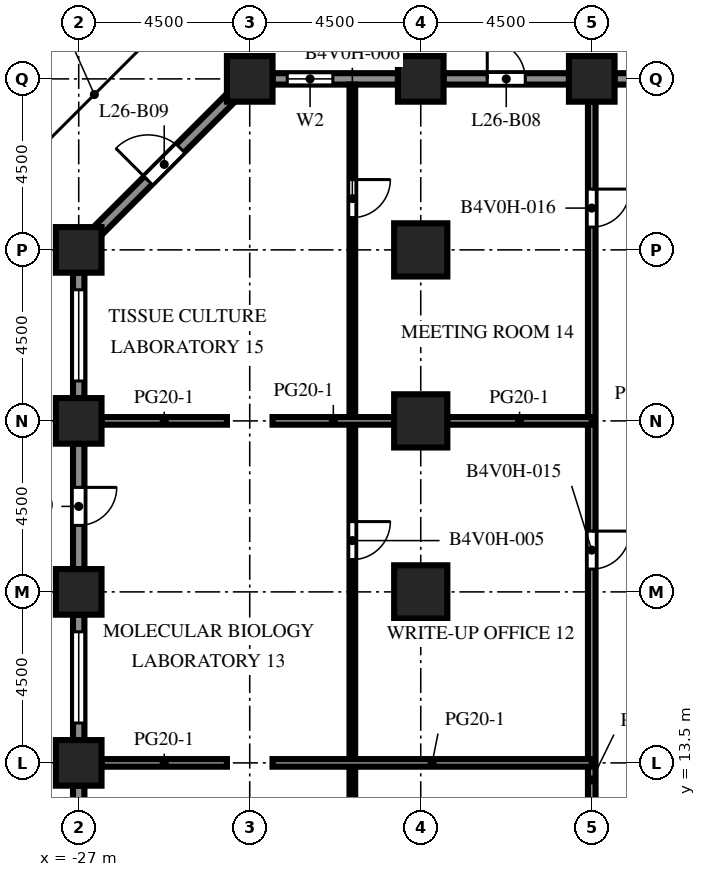
"""IFC4 building model, lengths in metres.
Left out: names, types, materials, properties, quantities, classifications, styles, units other than length and angle.
Written with IfcOpenShell. Run it as: python <this file> out.ifc"""

import sys

from ifc_helpers import new_model, si_unit, direction, frame, frame_2d, origin, origin_2d, place, context, subcontext, project, spatial, rectangle, extrude, element, fill, save


model = new_model("IFC4")
c1 = context("Model", 3, precision=1e-05, world=origin(), true_north=direction((0.0, 1.0)))
c2 = subcontext(c1, "Body", "Model", "MODEL_VIEW")
j1 = project(units=[si_unit("LENGTHUNIT", "METRE"), si_unit("PLANEANGLEUNIT", "RADIAN")], contexts=[c1])
p1 = place(None, origin())
s1 = spatial("IfcSite", under=j1, at=p1, CompositionType="ELEMENT")
p2 = place(p1, origin())
s2 = spatial("IfcBuilding", under=s1, at=p2, CompositionType="ELEMENT")
p3 = place(p2, frame((0.0, 0.0, 116.7)))
s3 = spatial("IfcBuildingStorey", under=s2, at=p3, CompositionType="ELEMENT", Elevation=116.7)
for number, where, z_axis, x_axis in (
    (1, (-27.0, 13.5, -0.45), (0.0, 0.0, 1.0), (1.0, 0.0, 0.0)),
    (2, (-27.0, 18.0, -0.45), (0.0, 0.0, 1.0), (1.0, 0.0, 0.0)),
    (3, (-27.0, 22.5, -0.45), (0.0, 0.0, 1.0), (1.0, 0.0, 0.0)),
    (4, (-27.0, 27.0, -0.45), (0.0, 0.0, 1.0), (1.0, 0.0, 0.0)),
):
    element("IfcColumn", number, at=place(p3, frame(where, z_axis=z_axis, x_axis=x_axis)), inside=s3, PredefinedType="COLUMN", context=c2, shape_type="SweptSolid", body=[
        extrude(rectangle(XDim=1.2, YDim=1.2, at=origin_2d()), origin(), (0.0, 0.0, 1.0), 4.55),
    ])
for number, where, z_axis, x_axis in (
    (5, (-22.5, 31.5, 0.0), (0.0, 0.0, 1.0), (1.0, 0.0, 0.0)),
    (6, (-18.0, 31.5, 0.0), (0.0, 0.0, 1.0), (1.0, 0.0, 0.0)),
    (7, (-13.5, 31.5, 0.0), (0.0, 0.0, 1.0), (1.0, 0.0, 0.0)),
):
    element("IfcColumn", number, at=place(p3, frame(where, z_axis=z_axis, x_axis=x_axis)), inside=s3, PredefinedType="COLUMN", context=c2, shape_type="SweptSolid", body=[
        extrude(rectangle(XDim=1.2, YDim=1.2, at=origin_2d()), origin(), (0.0, 0.0, 1.0), 4.1),
    ])
p4 = place(p3, frame((-18.0, 18.0, -0.45), z_axis=(0.0, 0.0, 1.0), x_axis=(1.0, 0.0, 0.0)))
e8 = element("IfcColumn", 8, at=p4, inside=s3, PredefinedType="COLUMN", context=c2, shape_type="SweptSolid", body=[
    extrude(rectangle(XDim=1.4, YDim=1.4, at=origin_2d()), origin(), (0.0, 0.0, 1.0), 4.55),
])
p5 = place(p3, frame((-18.0, 22.5, 0.0), z_axis=(0.0, 0.0, 1.0), x_axis=(1.0, 0.0, 0.0)))
e9 = element("IfcColumn", 9, at=p5, inside=s3, PredefinedType="COLUMN", context=c2, shape_type="SweptSolid", body=[
    extrude(rectangle(XDim=1.4, YDim=1.4, at=origin_2d()), origin(), (0.0, 0.0, 1.0), 4.1),
])
p6 = place(p3, frame((-18.0, 27.0, -0.45), z_axis=(0.0, 0.0, 1.0), x_axis=(1.0, 0.0, 0.0)))
e10 = element("IfcColumn", 10, at=p6, inside=s3, PredefinedType="COLUMN", context=c2, shape_type="SweptSolid", body=[
    extrude(rectangle(XDim=1.4, YDim=1.4, at=origin_2d()), origin(), (0.0, 0.0, 1.0), 4.55),
])
p7 = place(p3, frame((-12.9, 31.5, 0.0), z_axis=(0.0, 0.0, 1.0), x_axis=(1.0, 0.0, 0.0)))
e11 = element("IfcWall", 11, at=p7, inside=s3, PredefinedType="SOLIDWALL", context=c2, shape_type="SweptSolid", body=[
    extrude(rectangle(XDim=3.3, YDim=0.3, at=frame_2d((1.65, 0.0))), origin(), (0.0, 0.0, 1.0), 2.75),
])
p8 = place(p7, frame((0.525, 0.0, 0.8)))
e12 = element("IfcOpeningElement", 12, at=p8, cuts=e11, PredefinedType="OPENING", context=c2, shape_type="SweptSolid", body=[
    extrude(rectangle(XDim=1.2, YDim=1.7, at=frame_2d((0.6, 0.85))), frame((0.0, 0.16, 0.0), z_axis=(0.0, -1.0, 0.0), x_axis=(1.0, 0.0, 0.0)), (0.0, 0.0, 1.0), 0.32),
])
p9 = place(p3, frame((-17.4, 31.5, 0.0), z_axis=(0.0, 0.0, 1.0), x_axis=(1.0, 0.0, 0.0)))
e13 = element("IfcWall", 13, at=p9, inside=s3, PredefinedType="SOLIDWALL", context=c2, shape_type="SweptSolid", body=[
    extrude(rectangle(XDim=3.3, YDim=0.3, at=frame_2d((1.65, 0.0))), origin(), (0.0, 0.0, 1.0), 2.75),
])
p10 = place(p9, frame((1.15, 0.0, 0.0)))
e14 = element("IfcOpeningElement", 14, at=p10, cuts=e13, PredefinedType="OPENING", context=c2, shape_type="SweptSolid", body=[
    extrude(rectangle(XDim=1.0, YDim=2.2, at=frame_2d((0.5, 1.1))), frame((0.0, 0.16, 0.0), z_axis=(0.0, -1.0, 0.0), x_axis=(1.0, 0.0, 0.0)), (0.0, 0.0, 1.0), 0.32),
])
p11 = place(p3, frame((-21.9, 31.5, 0.0), z_axis=(0.0, 0.0, 1.0), x_axis=(1.0, 0.0, 0.0)))
e15 = element("IfcWall", 15, at=p11, inside=s3, PredefinedType="SOLIDWALL", context=c2, shape_type="SweptSolid", body=[
    extrude(rectangle(XDim=3.3, YDim=0.3, at=frame_2d((1.65, 0.0))), origin(), (0.0, 0.0, 1.0), 2.75),
])
p12 = place(p11, frame((0.387, 0.0, 0.8)))
e16 = element("IfcOpeningElement", 16, at=p12, cuts=e15, PredefinedType="OPENING", context=c2, shape_type="SweptSolid", body=[
    extrude(rectangle(XDim=1.2, YDim=1.7, at=frame_2d((0.6, 0.85))), frame((0.0, 0.16, 0.0), z_axis=(0.0, -1.0, 0.0), x_axis=(1.0, 0.0, 0.0)), (0.0, 0.0, 1.0), 0.32),
])
p13 = place(p3, frame((-26.506, 27.494, 0.0), z_axis=(0.0, 0.0, 1.0), x_axis=(0.707106781187, 0.707106781187, 0.0)))
e17 = element("IfcWall", 17, at=p13, inside=s3, PredefinedType="SOLIDWALL", context=c2, shape_type="SweptSolid", body=[
    extrude(rectangle(XDim=4.967, YDim=0.3, at=frame_2d((2.483, 0.0))), origin(), (0.0, 0.0, 1.0), 2.75),
])
p14 = place(p13, frame((1.884, 0.0, 0.0)))
e18 = element("IfcOpeningElement", 18, at=p14, cuts=e17, PredefinedType="OPENING", context=c2, shape_type="SweptSolid", body=[
    extrude(rectangle(XDim=1.2, YDim=2.2, at=frame_2d((0.6, 1.1))), frame((0.0, 0.16, 0.0), z_axis=(0.0, -1.0, 0.0), x_axis=(1.0, 0.0, 0.0)), (0.0, 0.0, 1.0), 0.32),
])
p15 = place(p3, frame((-27.0, 23.1, 0.0), z_axis=(0.0, 0.0, 1.0), x_axis=(0.0, 1.0, 0.0)))
e19 = element("IfcWall", 19, at=p15, inside=s3, PredefinedType="SOLIDWALL", context=c2, shape_type="SweptSolid", body=[
    extrude(rectangle(XDim=3.3, YDim=0.3, at=frame_2d((1.65, 0.0))), origin(), (0.0, 0.0, 1.0), 2.75),
])
p16 = place(p15, frame((0.45, 0.0, 0.8)))
e20 = element("IfcOpeningElement", 20, at=p16, cuts=e19, PredefinedType="OPENING", context=c2, shape_type="SweptSolid", body=[
    extrude(rectangle(XDim=2.4, YDim=1.7, at=frame_2d((1.2, 0.85))), frame((0.0, 0.16, 0.0), z_axis=(0.0, -1.0, 0.0), x_axis=(1.0, 0.0, 0.0)), (0.0, 0.0, 1.0), 0.32),
])
p17 = place(p3, frame((-27.0, 18.6, 0.0), z_axis=(0.0, 0.0, 1.0), x_axis=(0.0, 1.0, 0.0)))
e21 = element("IfcWall", 21, at=p17, inside=s3, PredefinedType="SOLIDWALL", context=c2, shape_type="SweptSolid", body=[
    extrude(rectangle(XDim=3.3, YDim=0.3, at=frame_2d((1.65, 0.0))), origin(), (0.0, 0.0, 1.0), 2.75),
])
p18 = place(p17, frame((1.15, 0.0, 0.0)))
e22 = element("IfcOpeningElement", 22, at=p18, cuts=e21, PredefinedType="OPENING", context=c2, shape_type="SweptSolid", body=[
    extrude(rectangle(XDim=1.0, YDim=2.2, at=frame_2d((0.5, 1.1))), frame((0.0, 0.16, 0.0), z_axis=(0.0, -1.0, 0.0), x_axis=(1.0, 0.0, 0.0)), (0.0, 0.0, 1.0), 0.32),
])
p19 = place(p3, frame((-27.0, 14.1, 0.0), z_axis=(0.0, 0.0, 1.0), x_axis=(0.0, 1.0, 0.0)))
e23 = element("IfcWall", 23, at=p19, inside=s3, PredefinedType="SOLIDWALL", context=c2, shape_type="SweptSolid", body=[
    extrude(rectangle(XDim=3.3, YDim=0.3, at=frame_2d((1.65, 0.0))), origin(), (0.0, 0.0, 1.0), 2.75),
])
p20 = place(p19, frame((0.45, 0.0, 0.8)))
e24 = element("IfcOpeningElement", 24, at=p20, cuts=e23, PredefinedType="OPENING", context=c2, shape_type="SweptSolid", body=[
    extrude(rectangle(XDim=2.4, YDim=1.7, at=frame_2d((1.2, 0.85))), frame((0.0, 0.16, 0.0), z_axis=(0.0, -1.0, 0.0), x_axis=(1.0, 0.0, 0.0)), (0.0, 0.0, 1.0), 0.32),
])
p21 = place(p3, frame((-27.0, 9.6, 0.0), z_axis=(0.0, 0.0, 1.0), x_axis=(0.0, 1.0, 0.0)))
e25 = element("IfcWall", 25, at=p21, inside=s3, PredefinedType="SOLIDWALL", context=c2, shape_type="SweptSolid", body=[
    extrude(rectangle(XDim=3.3, YDim=0.3, at=frame_2d((1.65, 0.0))), origin(), (0.0, 0.0, 1.0), 2.75),
])
p22 = place(p21, frame((0.45, 0.0, 0.8)))
e26 = element("IfcOpeningElement", 26, at=p22, cuts=e25, PredefinedType="OPENING", context=c2, shape_type="SweptSolid", body=[
    extrude(rectangle(XDim=2.4, YDim=1.7, at=frame_2d((1.2, 0.85))), frame((0.0, 0.16, 0.0), z_axis=(0.0, -1.0, 0.0), x_axis=(1.0, 0.0, 0.0)), (0.0, 0.0, 1.0), 0.32),
])
p23 = place(p3, frame((-19.8, -22.35, 0.0), z_axis=(0.0, 0.0, 1.0), x_axis=(0.0, 1.0, 0.0)))
e27 = element("IfcWall", 27, at=p23, inside=s3, PredefinedType="PARTITIONING", context=c2, shape_type="SweptSolid", body=[
    extrude(rectangle(XDim=53.7, YDim=0.15, at=frame_2d((26.85, 0.0))), origin(), (0.0, 0.0, 1.0), 3.65),
])
p24 = place(p23, frame((5.2, 0.0, 0.0)))
e28 = element("IfcOpeningElement", 28, at=p24, cuts=e27, PredefinedType="OPENING", context=c2, shape_type="SweptSolid", body=[
    extrude(rectangle(XDim=1.0, YDim=2.1, at=frame_2d((0.5, 1.05))), frame((0.0, 0.085, 0.0), z_axis=(0.0, -1.0, 0.0), x_axis=(1.0, 0.0, 0.0)), (0.0, 0.0, 1.0), 0.17),
])
p25 = place(p23, frame((11.45, 0.0, 0.0)))
e29 = element("IfcOpeningElement", 29, at=p25, cuts=e27, PredefinedType="OPENING", context=c2, shape_type="SweptSolid", body=[
    extrude(rectangle(XDim=1.0, YDim=2.1, at=frame_2d((0.5, 1.05))), frame((0.0, 0.085, 0.0), z_axis=(0.0, -1.0, 0.0), x_axis=(1.0, 0.0, 0.0)), (0.0, 0.0, 1.0), 0.17),
])
p26 = place(p23, frame((20.45, 0.0, 0.0)))
e30 = element("IfcOpeningElement", 30, at=p26, cuts=e27, PredefinedType="OPENING", context=c2, shape_type="SweptSolid", body=[
    extrude(rectangle(XDim=1.0, YDim=2.1, at=frame_2d((0.5, 1.05))), frame((0.0, 0.085, 0.0), z_axis=(0.0, -1.0, 0.0), x_axis=(1.0, 0.0, 0.0)), (0.0, 0.0, 1.0), 0.17),
])
p27 = place(p23, frame((27.85, 0.0, 0.0)))
e31 = element("IfcOpeningElement", 31, at=p27, cuts=e27, PredefinedType="OPENING", context=c2, shape_type="SweptSolid", body=[
    extrude(rectangle(XDim=1.0, YDim=2.1, at=frame_2d((0.5, 1.05))), frame((0.0, 0.085, 0.0), z_axis=(0.0, -1.0, 0.0), x_axis=(1.0, 0.0, 0.0)), (0.0, 0.0, 1.0), 0.17),
])
p28 = place(p23, frame((41.2, 0.0, 0.0)))
e32 = element("IfcOpeningElement", 32, at=p28, cuts=e27, PredefinedType="OPENING", context=c2, shape_type="SweptSolid", body=[
    extrude(rectangle(XDim=1.0, YDim=2.1, at=frame_2d((0.5, 1.05))), frame((0.0, 0.085, 0.0), z_axis=(0.0, -1.0, 0.0), x_axis=(1.0, 0.0, 0.0)), (0.0, 0.0, 1.0), 0.17),
])
p29 = place(p23, frame((50.2, 0.0, 0.0)))
e33 = element("IfcOpeningElement", 33, at=p29, cuts=e27, PredefinedType="OPENING", context=c2, shape_type="SweptSolid", body=[
    extrude(rectangle(XDim=1.0, YDim=2.1, at=frame_2d((0.5, 1.05))), frame((0.0, 0.085, 0.0), z_axis=(0.0, -1.0, 0.0), x_axis=(1.0, 0.0, 0.0)), (0.0, 0.0, 1.0), 0.17),
])
p30 = place(p3, frame((-13.5, -21.9, 0.0), z_axis=(0.0, 0.0, 1.0), x_axis=(0.0, 1.0, 0.0)))
e34 = element("IfcWall", 34, at=p30, inside=s3, PredefinedType="PARTITIONING", context=c2, shape_type="SweptSolid", body=[
    extrude(rectangle(XDim=52.8, YDim=0.2, at=frame_2d((26.4, 0.0))), origin(), (0.0, 0.0, 1.0), 3.65),
])
p31 = place(p30, frame((2.25, 0.0, 0.0)))
e35 = element("IfcOpeningElement", 35, at=p31, cuts=e34, PredefinedType="OPENING", context=c2, shape_type="SweptSolid", body=[
    extrude(rectangle(XDim=1.0, YDim=2.1, at=frame_2d((0.5, 1.05))), frame((0.0, 0.11, 0.0), z_axis=(0.0, -1.0, 0.0), x_axis=(1.0, 0.0, 0.0)), (0.0, 0.0, 1.0), 0.22),
])
p32 = place(p30, frame((13.5, 0.0, 0.0)))
e36 = element("IfcOpeningElement", 36, at=p32, cuts=e34, PredefinedType="OPENING", context=c2, shape_type="SweptSolid", body=[
    extrude(rectangle(XDim=1.0, YDim=2.1, at=frame_2d((0.5, 1.05))), frame((0.0, 0.11, 0.0), z_axis=(0.0, -1.0, 0.0), x_axis=(1.0, 0.0, 0.0)), (0.0, 0.0, 1.0), 0.22),
])
p33 = place(p30, frame((20.25, 0.0, 0.0)))
e37 = element("IfcOpeningElement", 37, at=p33, cuts=e34, PredefinedType="OPENING", context=c2, shape_type="SweptSolid", body=[
    extrude(rectangle(XDim=1.0, YDim=2.1, at=frame_2d((0.5, 1.05))), frame((0.0, 0.11, 0.0), z_axis=(0.0, -1.0, 0.0), x_axis=(1.0, 0.0, 0.0)), (0.0, 0.0, 1.0), 0.22),
])
p34 = place(p30, frame((28.4, 0.0, 0.0)))
e38 = element("IfcOpeningElement", 38, at=p34, cuts=e34, PredefinedType="OPENING", context=c2, shape_type="SweptSolid", body=[
    extrude(rectangle(XDim=1.0, YDim=2.1, at=frame_2d((0.5, 1.05))), frame((0.0, 0.11, 0.0), z_axis=(0.0, -1.0, 0.0), x_axis=(1.0, 0.0, 0.0)), (0.0, 0.0, 1.0), 0.22),
])
p35 = place(p30, frame((40.5, 0.0, 0.0)))
e39 = element("IfcOpeningElement", 39, at=p35, cuts=e34, PredefinedType="OPENING", context=c2, shape_type="SweptSolid", body=[
    extrude(rectangle(XDim=1.0, YDim=2.1, at=frame_2d((0.5, 1.05))), frame((0.0, 0.11, 0.0), z_axis=(0.0, -1.0, 0.0), x_axis=(1.0, 0.0, 0.0)), (0.0, 0.0, 1.0), 0.22),
])
p36 = place(p30, frame((49.5, 0.0, 0.0)))
e40 = element("IfcOpeningElement", 40, at=p36, cuts=e34, PredefinedType="OPENING", context=c2, shape_type="SweptSolid", body=[
    extrude(rectangle(XDim=1.0, YDim=2.1, at=frame_2d((0.5, 1.05))), frame((0.0, 0.11, 0.0), z_axis=(0.0, -1.0, 0.0), x_axis=(1.0, 0.0, 0.0)), (0.0, 0.0, 1.0), 0.22),
])
p37 = place(p3, frame((-26.4, 13.5, 0.0), z_axis=(0.0, 0.0, 1.0), x_axis=(1.0, 0.0, 0.0)))
e41 = element("IfcWall", 41, at=p37, inside=s3, PredefinedType="PARTITIONING", context=c2, shape_type="SweptSolid", body=[
    extrude(rectangle(XDim=3.3, YDim=0.2, at=frame_2d((1.65, 0.0))), origin(), (0.0, 0.0, 1.0), 3.65),
])
p38 = place(p3, frame((-21.9, 13.5, 0.0), z_axis=(0.0, 0.0, 1.0), x_axis=(1.0, 0.0, 0.0)))
e42 = element("IfcWall", 42, at=p38, inside=s3, PredefinedType="PARTITIONING", context=c2, shape_type="SweptSolid", body=[
    extrude(rectangle(XDim=8.4, YDim=0.2, at=frame_2d((4.2, 0.0))), origin(), (0.0, 0.0, 1.0), 3.65),
])
p39 = place(p3, frame((-26.4, 22.5, 0.0), z_axis=(0.0, 0.0, 1.0), x_axis=(1.0, 0.0, 0.0)))
e43 = element("IfcWall", 43, at=p39, inside=s3, PredefinedType="PARTITIONING", context=c2, shape_type="SweptSolid", body=[
    extrude(rectangle(XDim=3.3, YDim=0.2, at=frame_2d((1.65, 0.0))), origin(), (0.0, 0.0, 1.0), 3.65),
])
p40 = place(p3, frame((-21.9, 22.5, 0.0), z_axis=(0.0, 0.0, 1.0), x_axis=(1.0, 0.0, 0.0)))
e44 = element("IfcWall", 44, at=p40, inside=s3, PredefinedType="PARTITIONING", context=c2, shape_type="SweptSolid", body=[
    extrude(rectangle(XDim=3.2, YDim=0.2, at=frame_2d((1.6, 0.0))), origin(), (0.0, 0.0, 1.0), 3.65),
])
p41 = place(p3, frame((-17.3, 22.5, 0.0), z_axis=(0.0, 0.0, 1.0), x_axis=(1.0, 0.0, 0.0)))
e45 = element("IfcWall", 45, at=p41, inside=s3, PredefinedType="PARTITIONING", context=c2, shape_type="SweptSolid", body=[
    extrude(rectangle(XDim=3.8, YDim=0.2, at=frame_2d((1.9, 0.0))), origin(), (0.0, 0.0, 1.0), 3.65),
])
p42 = place(p10, origin())
e46 = element("IfcDoor", 46, at=p42, inside=s3, OperationType="SINGLE_SWING_LEFT", PredefinedType="DOOR", context=c2, shape_type="SweptSolid", body=[
    extrude(rectangle(XDim=1.0, YDim=2.2, at=frame_2d((0.5, 1.1))), frame((0.0, 0.025, 0.0), z_axis=(0.0, -1.0, 0.0), x_axis=(1.0, 0.0, 0.0)), (0.0, 0.0, 1.0), 0.05),
])
fill(e14, e46)
p43 = place(p12, origin())
e47 = element("IfcWindow", 47, at=p43, inside=s3, PartitioningType="SINGLE_PANEL", PredefinedType="WINDOW", context=c2, shape_type="SweptSolid", body=[
    extrude(rectangle(XDim=1.2, YDim=1.7, at=frame_2d((0.6, 0.85))), frame((0.0, 0.03, 0.0), z_axis=(0.0, -1.0, 0.0), x_axis=(1.0, 0.0, 0.0)), (0.0, 0.0, 1.0), 0.06),
])
fill(e16, e47)
p44 = place(p14, origin())
e48 = element("IfcDoor", 48, at=p44, inside=s3, OperationType="SINGLE_SWING_LEFT", PredefinedType="DOOR", context=c2, shape_type="SweptSolid", body=[
    extrude(rectangle(XDim=1.2, YDim=2.2, at=frame_2d((0.6, 1.1))), frame((0.0, 0.025, 0.0), z_axis=(0.0, -1.0, 0.0), x_axis=(1.0, 0.0, 0.0)), (0.0, 0.0, 1.0), 0.05),
])
fill(e18, e48)
p45 = place(p16, origin())
e49 = element("IfcWindow", 49, at=p45, inside=s3, PartitioningType="SINGLE_PANEL", PredefinedType="WINDOW", context=c2, shape_type="SweptSolid", body=[
    extrude(rectangle(XDim=2.4, YDim=1.7, at=frame_2d((1.2, 0.85))), frame((0.0, 0.03, 0.0), z_axis=(0.0, -1.0, 0.0), x_axis=(1.0, 0.0, 0.0)), (0.0, 0.0, 1.0), 0.06),
])
fill(e20, e49)
p46 = place(p18, origin())
e50 = element("IfcDoor", 50, at=p46, inside=s3, OperationType="SINGLE_SWING_RIGHT", PredefinedType="DOOR", context=c2, shape_type="SweptSolid", body=[
    extrude(rectangle(XDim=1.0, YDim=2.2, at=frame_2d((0.5, 1.1))), frame((0.0, 0.025, 0.0), z_axis=(0.0, -1.0, 0.0), x_axis=(1.0, 0.0, 0.0)), (0.0, 0.0, 1.0), 0.05),
])
fill(e22, e50)
p47 = place(p20, origin())
e51 = element("IfcWindow", 51, at=p47, inside=s3, PartitioningType="SINGLE_PANEL", PredefinedType="WINDOW", context=c2, shape_type="SweptSolid", body=[
    extrude(rectangle(XDim=2.4, YDim=1.7, at=frame_2d((1.2, 0.85))), frame((0.0, 0.03, 0.0), z_axis=(0.0, -1.0, 0.0), x_axis=(1.0, 0.0, 0.0)), (0.0, 0.0, 1.0), 0.06),
])
fill(e24, e51)
p48 = place(p28, origin())
e52 = element("IfcDoor", 52, at=p48, inside=s3, OperationType="SINGLE_SWING_RIGHT", PredefinedType="DOOR", context=c2, shape_type="SweptSolid", body=[
    extrude(rectangle(XDim=1.0, YDim=2.1, at=frame_2d((0.5, 1.05))), frame((0.0, 0.025, 0.0), z_axis=(0.0, -1.0, 0.0), x_axis=(1.0, 0.0, 0.0)), (0.0, 0.0, 1.0), 0.05),
])
fill(e32, e52)
p49 = place(p29, origin())
e53 = element("IfcDoor", 53, at=p49, inside=s3, OperationType="SINGLE_SWING_RIGHT", PredefinedType="DOOR", context=c2, shape_type="SweptSolid", body=[
    extrude(rectangle(XDim=1.0, YDim=2.1, at=frame_2d((0.5, 1.05))), frame((0.0, 0.025, 0.0), z_axis=(0.0, -1.0, 0.0), x_axis=(1.0, 0.0, 0.0)), (0.0, 0.0, 1.0), 0.05),
])
fill(e33, e53)
p50 = place(p35, origin())
e54 = element("IfcDoor", 54, at=p50, inside=s3, OperationType="SINGLE_SWING_RIGHT", PredefinedType="DOOR", context=c2, shape_type="SweptSolid", body=[
    extrude(rectangle(XDim=1.0, YDim=2.1, at=frame_2d((0.5, 1.05))), frame((0.0, 0.025, 0.0), z_axis=(0.0, -1.0, 0.0), x_axis=(1.0, 0.0, 0.0)), (0.0, 0.0, 1.0), 0.05),
])
fill(e39, e54)
p51 = place(p36, origin())
e55 = element("IfcDoor", 55, at=p51, inside=s3, OperationType="SINGLE_SWING_RIGHT", PredefinedType="DOOR", context=c2, shape_type="SweptSolid", body=[
    extrude(rectangle(XDim=1.0, YDim=2.1, at=frame_2d((0.5, 1.05))), frame((0.0, 0.025, 0.0), z_axis=(0.0, -1.0, 0.0), x_axis=(1.0, 0.0, 0.0)), (0.0, 0.0, 1.0), 0.05),
])
fill(e40, e55)
save(model, sys.argv[1])
